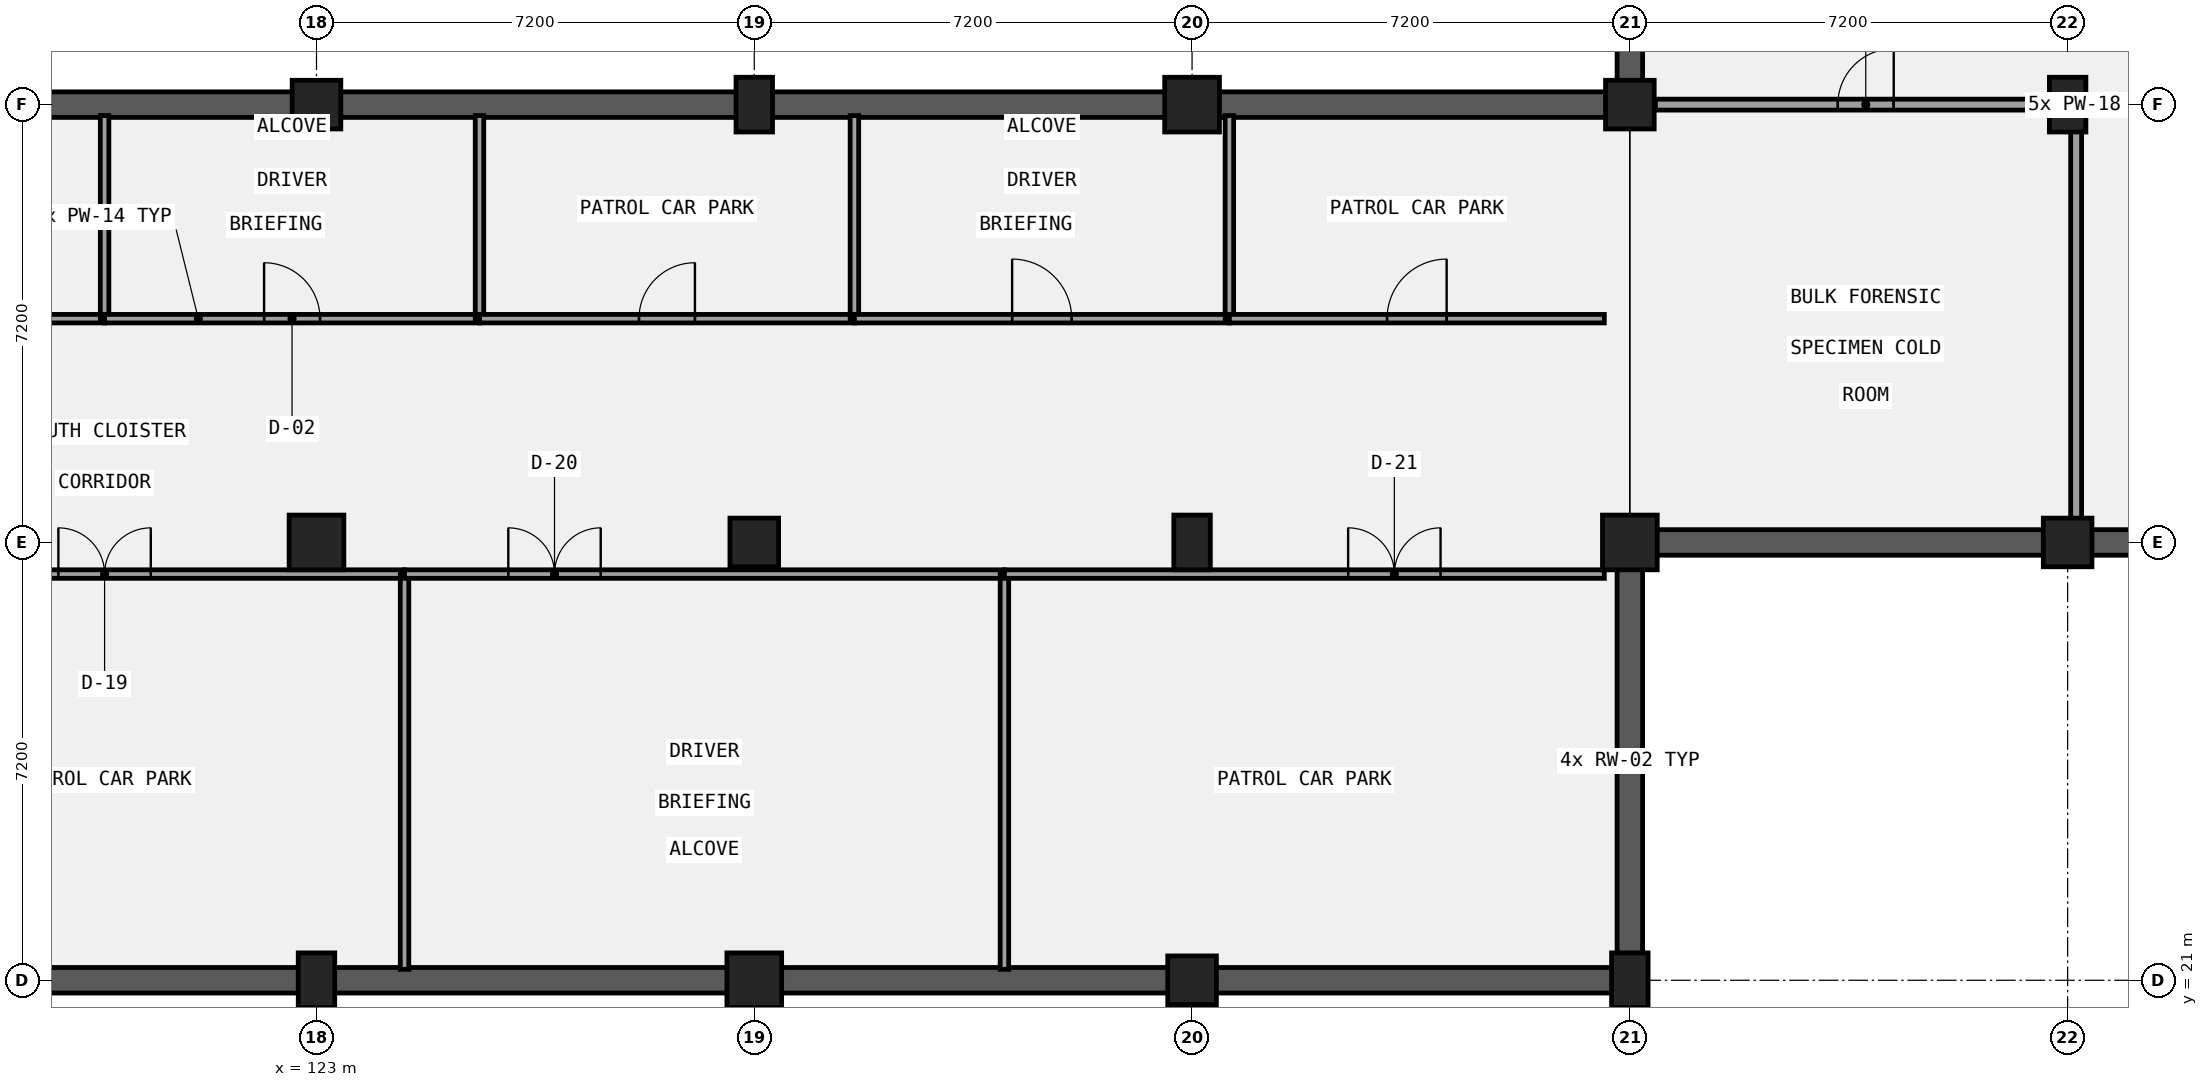
"""IFC4 building model, lengths in metres.
Left out: names, types, materials, properties, quantities, classifications, styles, units other than length and angle.
Written with IfcOpenShell. Run it as: python <this file> out.ifc"""

import sys

from ifc_helpers import new_model, si_unit, direction, frame, frame_2d, origin, origin_2d, place, context, subcontext, project, spatial, rectangle, extrude, element, fill, save


model = new_model("IFC4")
c1 = context("Model", 3, precision=1e-05, world=origin(), true_north=direction((0.0, 1.0)))
c2 = subcontext(c1, "Body", "Model", "MODEL_VIEW")
j1 = project(units=[si_unit("LENGTHUNIT", "METRE"), si_unit("PLANEANGLEUNIT", "RADIAN")], contexts=[c1])
p1 = place(None, origin())
s1 = spatial("IfcSite", under=j1, at=p1, CompositionType="ELEMENT")
p2 = place(p1, origin())
s2 = spatial("IfcBuilding", under=s1, at=p2, CompositionType="ELEMENT")
p3 = place(p2, frame((0.0, 0.0, -4.2)))
s3 = spatial("IfcBuildingStorey", under=s2, at=p3, CompositionType="ELEMENT", Elevation=-4.2)
p4 = place(p3, frame((166.41, 28.2, 0.0), z_axis=(0.0, 0.0, 1.0), x_axis=(-1.0, 0.0, 0.0)))
e1 = element("IfcWall", 1, at=p4, inside=s3, PredefinedType="USERDEFINED", context=c2, shape_type="SweptSolid", body=[
    extrude(rectangle(XDim=22.02, YDim=0.42, at=frame_2d((11.01, 0.0))), origin(), (0.0, 0.0, 1.0), 2.88),
])
p5 = place(p3, frame((144.6, 28.0, 0.0), z_axis=(0.0, 0.0, 1.0), x_axis=(0.0, -1.0, 0.0)))
e2 = element("IfcWall", 2, at=p5, inside=s3, PredefinedType="USERDEFINED", context=c2, shape_type="SweptSolid", body=[
    extrude(rectangle(XDim=6.8, YDim=0.42, at=frame_2d((3.4, 0.0))), origin(), (0.0, 0.0, 1.0), 3.33),
])
p6 = place(p3, frame((144.81, 21.0, 0.0), z_axis=(0.0, 0.0, 1.0), x_axis=(-1.0, 0.0, 0.0)))
e3 = element("IfcWall", 3, at=p6, inside=s3, PredefinedType="USERDEFINED", context=c2, shape_type="SweptSolid", body=[
    extrude(rectangle(XDim=115.62, YDim=0.42, at=frame_2d((57.81, 0.0))), origin(), (0.0, 0.0, 1.0), 2.88),
])
p7 = place(p3, frame((94.43, 35.4, 0.0), z_axis=(0.0, 0.0, 1.0), x_axis=(1.0, 0.0, 0.0)))
e4 = element("IfcWall", 4, at=p7, inside=s3, PredefinedType="USERDEFINED", context=c2, shape_type="SweptSolid", body=[
    extrude(rectangle(XDim=50.38, YDim=0.42, at=frame_2d((25.19, 0.0))), origin(), (0.0, 0.0, 1.0), 2.98),
])
p8 = place(p3, frame((144.6, 35.6, 0.0), z_axis=(0.0, 0.0, 1.0), x_axis=(0.0, 1.0, 0.0)))
e5 = element("IfcWall", 5, at=p8, inside=s3, PredefinedType="USERDEFINED", context=c2, shape_type="SweptSolid", body=[
    extrude(rectangle(XDim=42.8, YDim=0.42, at=frame_2d((21.4, 0.0))), origin(), (0.0, 0.0, 1.0), 2.98),
])
p9 = place(p3, frame((123.0, 21.0, 0.0), z_axis=(0.0, 0.0, 1.0), x_axis=(1.0, 0.0, 0.0)))
e6 = element("IfcColumn", 6, at=p9, inside=s3, PredefinedType="COLUMN", context=c2, shape_type="SweptSolid", body=[
    extrude(rectangle(XDim=0.6, YDim=0.9, at=origin_2d()), origin(), (0.0, 0.0, 1.0), 4.2),
])
p10 = place(p3, frame((123.0, 28.2, 0.0), z_axis=(0.0, 0.0, 1.0), x_axis=(1.0, 0.0, 0.0)))
e7 = element("IfcColumn", 7, at=p10, inside=s3, PredefinedType="COLUMN", context=c2, shape_type="SweptSolid", body=[
    extrude(rectangle(XDim=0.9, YDim=0.9, at=origin_2d()), origin(), (0.0, 0.0, 1.0), 4.2),
])
p11 = place(p3, frame((123.0, 35.4, 0.0), z_axis=(0.0, 0.0, 1.0), x_axis=(1.0, 0.0, 0.0)))
e8 = element("IfcColumn", 8, at=p11, inside=s3, PredefinedType="COLUMN", context=c2, shape_type="SweptSolid", body=[
    extrude(rectangle(XDim=0.8, YDim=0.8, at=origin_2d()), origin(), (0.0, 0.0, 1.0), 4.2),
])
p12 = place(p3, frame((130.2, 21.0, 0.0), z_axis=(0.0, 0.0, 1.0), x_axis=(1.0, 0.0, 0.0)))
e9 = element("IfcColumn", 9, at=p12, inside=s3, PredefinedType="COLUMN", context=c2, shape_type="SweptSolid", body=[
    extrude(rectangle(XDim=0.9, YDim=0.9, at=origin_2d()), origin(), (0.0, 0.0, 1.0), 4.2),
])
p13 = place(p3, frame((130.2, 28.2, 0.0), z_axis=(0.0, 0.0, 1.0), x_axis=(1.0, 0.0, 0.0)))
e10 = element("IfcColumn", 10, at=p13, inside=s3, PredefinedType="COLUMN", context=c2, shape_type="SweptSolid", body=[
    extrude(rectangle(XDim=0.8, YDim=0.8, at=origin_2d()), origin(), (0.0, 0.0, 1.0), 4.2),
])
p14 = place(p3, frame((130.2, 35.4, 0.0), z_axis=(0.0, 0.0, 1.0), x_axis=(1.0, 0.0, 0.0)))
e11 = element("IfcColumn", 11, at=p14, inside=s3, PredefinedType="COLUMN", context=c2, shape_type="SweptSolid", body=[
    extrude(rectangle(XDim=0.6, YDim=0.9, at=origin_2d()), origin(), (0.0, 0.0, 1.0), 4.2),
])
p15 = place(p3, frame((137.4, 21.0, 0.0), z_axis=(0.0, 0.0, 1.0), x_axis=(1.0, 0.0, 0.0)))
e12 = element("IfcColumn", 12, at=p15, inside=s3, PredefinedType="COLUMN", context=c2, shape_type="SweptSolid", body=[
    extrude(rectangle(XDim=0.8, YDim=0.8, at=origin_2d()), origin(), (0.0, 0.0, 1.0), 4.2),
])
p16 = place(p3, frame((137.4, 28.2, 0.0), z_axis=(0.0, 0.0, 1.0), x_axis=(1.0, 0.0, 0.0)))
e13 = element("IfcColumn", 13, at=p16, inside=s3, PredefinedType="COLUMN", context=c2, shape_type="SweptSolid", body=[
    extrude(rectangle(XDim=0.6, YDim=0.9, at=origin_2d()), origin(), (0.0, 0.0, 1.0), 4.2),
])
p17 = place(p3, frame((137.4, 35.4, 0.0), z_axis=(0.0, 0.0, 1.0), x_axis=(1.0, 0.0, 0.0)))
e14 = element("IfcColumn", 14, at=p17, inside=s3, PredefinedType="COLUMN", context=c2, shape_type="SweptSolid", body=[
    extrude(rectangle(XDim=0.9, YDim=0.9, at=origin_2d()), origin(), (0.0, 0.0, 1.0), 4.2),
])
p18 = place(p3, frame((144.6, 21.0, 0.0), z_axis=(0.0, 0.0, 1.0), x_axis=(1.0, 0.0, 0.0)))
e15 = element("IfcColumn", 15, at=p18, inside=s3, PredefinedType="COLUMN", context=c2, shape_type="SweptSolid", body=[
    extrude(rectangle(XDim=0.6, YDim=0.9, at=origin_2d()), origin(), (0.0, 0.0, 1.0), 4.2),
])
p19 = place(p3, frame((144.6, 28.2, 0.0), z_axis=(0.0, 0.0, 1.0), x_axis=(1.0, 0.0, 0.0)))
e16 = element("IfcColumn", 16, at=p19, inside=s3, PredefinedType="COLUMN", context=c2, shape_type="SweptSolid", body=[
    extrude(rectangle(XDim=0.9, YDim=0.9, at=origin_2d()), origin(), (0.0, 0.0, 1.0), 4.2),
])
for number, where, z_axis, x_axis in (
    (17, (144.6, 35.4, 0.0), (0.0, 0.0, 1.0), (1.0, 0.0, 0.0)),
    (18, (151.8, 28.2, 0.0), (0.0, 0.0, 1.0), (1.0, 0.0, 0.0)),
):
    element("IfcColumn", number, at=place(p3, frame(where, z_axis=z_axis, x_axis=x_axis)), inside=s3, PredefinedType="COLUMN", context=c2, shape_type="SweptSolid", body=[
        extrude(rectangle(XDim=0.8, YDim=0.8, at=origin_2d()), origin(), (0.0, 0.0, 1.0), 4.2),
    ])
p20 = place(p3, frame((151.8, 35.4, 0.0), z_axis=(0.0, 0.0, 1.0), x_axis=(1.0, 0.0, 0.0)))
e19 = element("IfcColumn", 19, at=p20, inside=s3, PredefinedType="COLUMN", context=c2, shape_type="SweptSolid", body=[
    extrude(rectangle(XDim=0.6, YDim=0.9, at=origin_2d()), origin(), (0.0, 0.0, 1.0), 4.2),
])
p21 = place(p3, frame((114.582, 27.68, 0.0), z_axis=(0.0, 0.0, 1.0), x_axis=(1.0, 0.0, 0.0)))
e20 = element("IfcWall", 20, at=p21, inside=s3, PredefinedType="PARTITIONING", context=c2, shape_type="SweptSolid", body=[
    extrude(rectangle(XDim=9.866, YDim=0.14, at=frame_2d((4.933, 0.0))), origin(), (0.0, 0.0, 1.0), 3.88),
])
p22 = place(p21, frame((4.173, 0.0, 0.0)))
e21 = element("IfcOpeningElement", 21, at=p22, cuts=e20, PredefinedType="OPENING", context=c2, shape_type="SweptSolid", body=[
    extrude(rectangle(XDim=1.52, YDim=2.1, at=frame_2d((0.76, 1.05))), frame((0.0, 0.08, 0.0), z_axis=(0.0, -1.0, 0.0), x_axis=(1.0, 0.0, 0.0)), (0.0, 0.0, 1.0), 0.16),
])
p23 = place(p3, frame((124.448, 21.18, 0.0), z_axis=(0.0, 0.0, 1.0), x_axis=(0.0, 1.0, 0.0)))
e22 = element("IfcWall", 22, at=p23, inside=s3, PredefinedType="PARTITIONING", context=c2, shape_type="SweptSolid", body=[
    extrude(rectangle(XDim=6.5, YDim=0.14, at=frame_2d((3.25, 0.0))), origin(), (0.0, 0.0, 1.0), 3.88),
])
p24 = place(p3, frame((124.448, 27.68, 0.0), z_axis=(0.0, 0.0, 1.0), x_axis=(1.0, 0.0, 0.0)))
e23 = element("IfcWall", 23, at=p24, inside=s3, PredefinedType="PARTITIONING", context=c2, shape_type="SweptSolid", body=[
    extrude(rectangle(XDim=9.866, YDim=0.14, at=frame_2d((4.933, 0.0))), origin(), (0.0, 0.0, 1.0), 3.88),
])
p25 = place(p24, frame((1.707, 0.0, 0.0)))
e24 = element("IfcOpeningElement", 24, at=p25, cuts=e23, PredefinedType="OPENING", context=c2, shape_type="SweptSolid", body=[
    extrude(rectangle(XDim=1.52, YDim=2.22, at=frame_2d((0.76, 1.11))), frame((0.0, 0.08, 0.0), z_axis=(0.0, -1.0, 0.0), x_axis=(1.0, 0.0, 0.0)), (0.0, 0.0, 1.0), 0.16),
])
p26 = place(p3, frame((134.314, 21.18, 0.0), z_axis=(0.0, 0.0, 1.0), x_axis=(0.0, 1.0, 0.0)))
e25 = element("IfcWall", 25, at=p26, inside=s3, PredefinedType="PARTITIONING", context=c2, shape_type="SweptSolid", body=[
    extrude(rectangle(XDim=6.5, YDim=0.14, at=frame_2d((3.25, 0.0))), origin(), (0.0, 0.0, 1.0), 3.88),
])
p27 = place(p3, frame((134.314, 27.68, 0.0), z_axis=(0.0, 0.0, 1.0), x_axis=(1.0, 0.0, 0.0)))
e26 = element("IfcWall", 26, at=p27, inside=s3, PredefinedType="PARTITIONING", context=c2, shape_type="SweptSolid", body=[
    extrude(rectangle(XDim=9.866, YDim=0.14, at=frame_2d((4.933, 0.0))), origin(), (0.0, 0.0, 1.0), 3.88),
])
p28 = place(p27, frame((5.653, 0.0, 0.0)))
e27 = element("IfcOpeningElement", 27, at=p28, cuts=e26, PredefinedType="OPENING", context=c2, shape_type="SweptSolid", body=[
    extrude(rectangle(XDim=1.52, YDim=2.35, at=frame_2d((0.76, 1.175))), frame((0.0, 0.08, 0.0), z_axis=(0.0, -1.0, 0.0), x_axis=(1.0, 0.0, 0.0)), (0.0, 0.0, 1.0), 0.16),
])
p29 = place(p3, frame((113.349, 31.88, 0.0), z_axis=(0.0, 0.0, 1.0), x_axis=(1.0, 0.0, 0.0)))
e28 = element("IfcWall", 28, at=p29, inside=s3, PredefinedType="PARTITIONING", context=c2, shape_type="SweptSolid", body=[
    extrude(rectangle(XDim=6.166, YDim=0.14, at=frame_2d((3.083, 0.0))), origin(), (0.0, 0.0, 1.0), 3.33),
])
p30 = place(p29, frame((2.623, 0.0, 0.0)))
e29 = element("IfcOpeningElement", 29, at=p30, cuts=e28, PredefinedType="OPENING", context=c2, shape_type="SweptSolid", body=[
    extrude(rectangle(XDim=0.92, YDim=2.1, at=frame_2d((0.46, 1.05))), frame((0.0, 0.08, 0.0), z_axis=(0.0, -1.0, 0.0), x_axis=(1.0, 0.0, 0.0)), (0.0, 0.0, 1.0), 0.16),
])
p31 = place(p3, frame((119.515, 31.88, 0.0), z_axis=(0.0, 0.0, 1.0), x_axis=(0.0, 1.0, 0.0)))
e30 = element("IfcWall", 30, at=p31, inside=s3, PredefinedType="PARTITIONING", context=c2, shape_type="SweptSolid", body=[
    extrude(rectangle(XDim=3.34, YDim=0.14, at=frame_2d((1.67, 0.0))), origin(), (0.0, 0.0, 1.0), 3.88),
])
p32 = place(p3, frame((119.515, 31.88, 0.0), z_axis=(0.0, 0.0, 1.0), x_axis=(1.0, 0.0, 0.0)))
e31 = element("IfcWall", 31, at=p32, inside=s3, PredefinedType="PARTITIONING", context=c2, shape_type="SweptSolid", body=[
    extrude(rectangle(XDim=6.166, YDim=0.14, at=frame_2d((3.083, 0.0))), origin(), (0.0, 0.0, 1.0), 3.33),
])
p33 = place(p32, frame((2.623, 0.0, 0.0)))
e32 = element("IfcOpeningElement", 32, at=p33, cuts=e31, PredefinedType="OPENING", context=c2, shape_type="SweptSolid", body=[
    extrude(rectangle(XDim=0.92, YDim=2.22, at=frame_2d((0.46, 1.11))), frame((0.0, 0.08, 0.0), z_axis=(0.0, -1.0, 0.0), x_axis=(1.0, 0.0, 0.0)), (0.0, 0.0, 1.0), 0.16),
])
p34 = place(p3, frame((125.681, 31.88, 0.0), z_axis=(0.0, 0.0, 1.0), x_axis=(0.0, 1.0, 0.0)))
e33 = element("IfcWall", 33, at=p34, inside=s3, PredefinedType="PARTITIONING", context=c2, shape_type="SweptSolid", body=[
    extrude(rectangle(XDim=3.34, YDim=0.14, at=frame_2d((1.67, 0.0))), origin(), (0.0, 0.0, 1.0), 3.88),
])
p35 = place(p3, frame((125.681, 31.88, 0.0), z_axis=(0.0, 0.0, 1.0), x_axis=(1.0, 0.0, 0.0)))
e34 = element("IfcWall", 34, at=p35, inside=s3, PredefinedType="PARTITIONING", context=c2, shape_type="SweptSolid", body=[
    extrude(rectangle(XDim=6.166, YDim=0.14, at=frame_2d((3.083, 0.0))), origin(), (0.0, 0.0, 1.0), 3.33),
])
p36 = place(p35, frame((2.623, 0.0, 0.0)))
e35 = element("IfcOpeningElement", 35, at=p36, cuts=e34, PredefinedType="OPENING", context=c2, shape_type="SweptSolid", body=[
    extrude(rectangle(XDim=0.92, YDim=2.35, at=frame_2d((0.46, 1.175))), frame((0.0, 0.08, 0.0), z_axis=(0.0, -1.0, 0.0), x_axis=(1.0, 0.0, 0.0)), (0.0, 0.0, 1.0), 0.16),
])
p37 = place(p3, frame((131.847, 31.88, 0.0), z_axis=(0.0, 0.0, 1.0), x_axis=(0.0, 1.0, 0.0)))
e36 = element("IfcWall", 36, at=p37, inside=s3, PredefinedType="PARTITIONING", context=c2, shape_type="SweptSolid", body=[
    extrude(rectangle(XDim=3.34, YDim=0.14, at=frame_2d((1.67, 0.0))), origin(), (0.0, 0.0, 1.0), 3.88),
])
p38 = place(p3, frame((131.847, 31.88, 0.0), z_axis=(0.0, 0.0, 1.0), x_axis=(1.0, 0.0, 0.0)))
e37 = element("IfcWall", 37, at=p38, inside=s3, PredefinedType="PARTITIONING", context=c2, shape_type="SweptSolid", body=[
    extrude(rectangle(XDim=6.167, YDim=0.14, at=frame_2d((3.083, 0.0))), origin(), (0.0, 0.0, 1.0), 3.33),
])
p39 = place(p38, frame((2.594, 0.0, 0.0)))
e38 = element("IfcOpeningElement", 38, at=p39, cuts=e37, PredefinedType="OPENING", context=c2, shape_type="SweptSolid", body=[
    extrude(rectangle(XDim=0.98, YDim=2.1, at=frame_2d((0.49, 1.05))), frame((0.0, 0.08, 0.0), z_axis=(0.0, -1.0, 0.0), x_axis=(1.0, 0.0, 0.0)), (0.0, 0.0, 1.0), 0.16),
])
p40 = place(p3, frame((138.014, 31.88, 0.0), z_axis=(0.0, 0.0, 1.0), x_axis=(0.0, 1.0, 0.0)))
e39 = element("IfcWall", 39, at=p40, inside=s3, PredefinedType="PARTITIONING", context=c2, shape_type="SweptSolid", body=[
    extrude(rectangle(XDim=3.34, YDim=0.14, at=frame_2d((1.67, 0.0))), origin(), (0.0, 0.0, 1.0), 3.88),
])
p41 = place(p3, frame((138.014, 31.88, 0.0), z_axis=(0.0, 0.0, 1.0), x_axis=(1.0, 0.0, 0.0)))
e40 = element("IfcWall", 40, at=p41, inside=s3, PredefinedType="PARTITIONING", context=c2, shape_type="SweptSolid", body=[
    extrude(rectangle(XDim=6.166, YDim=0.14, at=frame_2d((3.083, 0.0))), origin(), (0.0, 0.0, 1.0), 3.33),
])
p42 = place(p41, frame((2.593, 0.0, 0.0)))
e41 = element("IfcOpeningElement", 41, at=p42, cuts=e40, PredefinedType="OPENING", context=c2, shape_type="SweptSolid", body=[
    extrude(rectangle(XDim=0.98, YDim=2.22, at=frame_2d((0.49, 1.11))), frame((0.0, 0.08, 0.0), z_axis=(0.0, -1.0, 0.0), x_axis=(1.0, 0.0, 0.0)), (0.0, 0.0, 1.0), 0.16),
])
p43 = place(p3, frame((145.02, 35.4, 0.0), z_axis=(0.0, 0.0, 1.0), x_axis=(1.0, 0.0, 0.0)))
e42 = element("IfcWall", 42, at=p43, inside=s3, PredefinedType="PARTITIONING", context=c2, shape_type="SweptSolid", body=[
    extrude(rectangle(XDim=6.92, YDim=0.18, at=frame_2d((3.46, 0.0))), origin(), (0.0, 0.0, 1.0), 2.88),
])
p44 = place(p43, frame((3.0, 0.0, 0.0)))
e43 = element("IfcOpeningElement", 43, at=p44, cuts=e42, PredefinedType="OPENING", context=c2, shape_type="SweptSolid", body=[
    extrude(rectangle(XDim=0.92, YDim=2.35, at=frame_2d((0.46, 1.175))), frame((0.0, 0.1, 0.0), z_axis=(0.0, -1.0, 0.0), x_axis=(1.0, 0.0, 0.0)), (0.0, 0.0, 1.0), 0.2),
])
p45 = place(p3, frame((151.94, 28.38, 0.0), z_axis=(0.0, 0.0, 1.0), x_axis=(0.0, 1.0, 0.0)))
e44 = element("IfcWall", 44, at=p45, inside=s3, PredefinedType="PARTITIONING", context=c2, shape_type="SweptSolid", body=[
    extrude(rectangle(XDim=7.02, YDim=0.18, at=frame_2d((3.51, 0.0))), origin(), (0.0, 0.0, 1.0), 3.23),
])
p46 = place(p3, frame((151.94, 35.4, 0.0), z_axis=(0.0, 0.0, 1.0), x_axis=(1.0, 0.0, 0.0)))
e45 = element("IfcWall", 45, at=p46, inside=s3, PredefinedType="PARTITIONING", context=c2, shape_type="SweptSolid", body=[
    extrude(rectangle(XDim=6.92, YDim=0.18, at=frame_2d((3.46, 0.0))), origin(), (0.0, 0.0, 1.0), 3.33),
])
p47 = place(p46, frame((2.97, 0.0, 0.0)))
e46 = element("IfcOpeningElement", 46, at=p47, cuts=e45, PredefinedType="OPENING", context=c2, shape_type="SweptSolid", body=[
    extrude(rectangle(XDim=0.98, YDim=2.1, at=frame_2d((0.49, 1.05))), frame((0.0, 0.1, 0.0), z_axis=(0.0, -1.0, 0.0), x_axis=(1.0, 0.0, 0.0)), (0.0, 0.0, 1.0), 0.2),
])
p48 = place(p22, frame((1.52, 0.0, 0.0), z_axis=(0.0, 0.0, 1.0), x_axis=(-1.0, 0.0, 0.0)))
e47 = element("IfcDoor", 47, at=p48, inside=s3, OperationType="DOUBLE_DOOR_SINGLE_SWING", PredefinedType="DOOR", context=c2, shape_type="SweptSolid", body=[
    extrude(rectangle(XDim=1.52, YDim=2.1, at=frame_2d((0.76, 1.05))), frame((0.0, 0.025, 0.0), z_axis=(0.0, -1.0, 0.0), x_axis=(1.0, 0.0, 0.0)), (0.0, 0.0, 1.0), 0.05),
])
fill(e21, e47)
p49 = place(p25, frame((1.52, 0.0, 0.0), z_axis=(0.0, 0.0, 1.0), x_axis=(-1.0, 0.0, 0.0)))
e48 = element("IfcDoor", 48, at=p49, inside=s3, OperationType="DOUBLE_DOOR_SINGLE_SWING", PredefinedType="DOOR", context=c2, shape_type="SweptSolid", body=[
    extrude(rectangle(XDim=1.52, YDim=2.22, at=frame_2d((0.76, 1.11))), frame((0.0, 0.025, 0.0), z_axis=(0.0, -1.0, 0.0), x_axis=(1.0, 0.0, 0.0)), (0.0, 0.0, 1.0), 0.05),
])
fill(e24, e48)
p50 = place(p28, frame((1.52, 0.0, 0.0), z_axis=(0.0, 0.0, 1.0), x_axis=(-1.0, 0.0, 0.0)))
e49 = element("IfcDoor", 49, at=p50, inside=s3, OperationType="DOUBLE_DOOR_SINGLE_SWING", PredefinedType="DOOR", context=c2, shape_type="SweptSolid", body=[
    extrude(rectangle(XDim=1.52, YDim=2.35, at=frame_2d((0.76, 1.175))), frame((0.0, 0.025, 0.0), z_axis=(0.0, -1.0, 0.0), x_axis=(1.0, 0.0, 0.0)), (0.0, 0.0, 1.0), 0.05),
])
fill(e27, e49)
p51 = place(p33, origin())
e50 = element("IfcDoor", 50, at=p51, inside=s3, OperationType="SINGLE_SWING_LEFT", PredefinedType="DOOR", context=c2, shape_type="SweptSolid", body=[
    extrude(rectangle(XDim=0.92, YDim=2.22, at=frame_2d((0.46, 1.11))), frame((0.0, 0.025, 0.0), z_axis=(0.0, -1.0, 0.0), x_axis=(1.0, 0.0, 0.0)), (0.0, 0.0, 1.0), 0.05),
])
fill(e32, e50)
p52 = place(p36, origin())
e51 = element("IfcDoor", 51, at=p52, inside=s3, OperationType="SINGLE_SWING_RIGHT", PredefinedType="DOOR", context=c2, shape_type="SweptSolid", body=[
    extrude(rectangle(XDim=0.92, YDim=2.35, at=frame_2d((0.46, 1.175))), frame((0.0, 0.025, 0.0), z_axis=(0.0, -1.0, 0.0), x_axis=(1.0, 0.0, 0.0)), (0.0, 0.0, 1.0), 0.05),
])
fill(e35, e51)
p53 = place(p39, origin())
e52 = element("IfcDoor", 52, at=p53, inside=s3, OperationType="SINGLE_SWING_LEFT", PredefinedType="DOOR", context=c2, shape_type="SweptSolid", body=[
    extrude(rectangle(XDim=0.98, YDim=2.1, at=frame_2d((0.49, 1.05))), frame((0.0, 0.025, 0.0), z_axis=(0.0, -1.0, 0.0), x_axis=(1.0, 0.0, 0.0)), (0.0, 0.0, 1.0), 0.05),
])
fill(e38, e52)
p54 = place(p42, origin())
e53 = element("IfcDoor", 53, at=p54, inside=s3, OperationType="SINGLE_SWING_RIGHT", PredefinedType="DOOR", context=c2, shape_type="SweptSolid", body=[
    extrude(rectangle(XDim=0.98, YDim=2.22, at=frame_2d((0.49, 1.11))), frame((0.0, 0.025, 0.0), z_axis=(0.0, -1.0, 0.0), x_axis=(1.0, 0.0, 0.0)), (0.0, 0.0, 1.0), 0.05),
])
fill(e41, e53)
p55 = place(p44, frame((0.92, 0.0, 0.0), z_axis=(0.0, 0.0, 1.0), x_axis=(-1.0, 0.0, 0.0)))
e54 = element("IfcDoor", 54, at=p55, inside=s3, OperationType="SINGLE_SWING_RIGHT", PredefinedType="DOOR", context=c2, shape_type="SweptSolid", body=[
    extrude(rectangle(XDim=0.92, YDim=2.35, at=frame_2d((0.46, 1.175))), frame((0.0, 0.025, 0.0), z_axis=(0.0, -1.0, 0.0), x_axis=(1.0, 0.0, 0.0)), (0.0, 0.0, 1.0), 0.05),
])
fill(e43, e54)
save(model, sys.argv[1])
